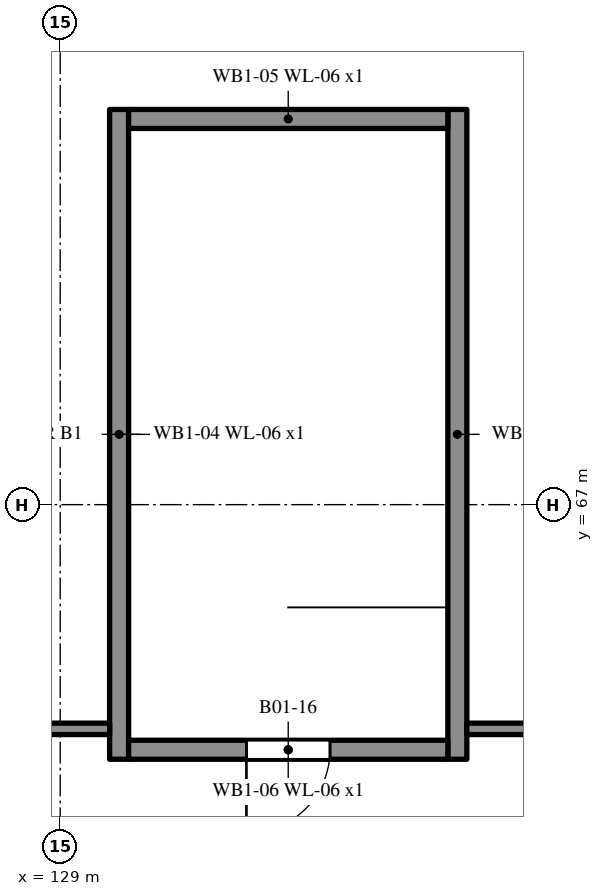
"""IFC4 building model, lengths in metres.
Left out: names, types, materials, properties, quantities, classifications, styles, units other than length and angle.
Written with IfcOpenShell. Run it as: python <this file> out.ifc"""

import sys

from ifc_helpers import new_model, si_unit, direction, frame, frame_2d, origin, place, context, subcontext, project, spatial, rectangle, extrude, element, fill, save


model = new_model("IFC4")
c1 = context("Model", 3, precision=1e-05, world=origin(), true_north=direction((0.0, 1.0)))
c2 = subcontext(c1, "Body", "Model", "MODEL_VIEW")
j1 = project(units=[si_unit("LENGTHUNIT", "METRE"), si_unit("PLANEANGLEUNIT", "RADIAN")], contexts=[c1])
p1 = place(None, origin())
s1 = spatial("IfcSite", under=j1, at=p1, CompositionType="ELEMENT")
p2 = place(p1, origin())
s2 = spatial("IfcBuilding", under=s1, at=p2, CompositionType="ELEMENT")
p3 = place(p2, frame((0.0, 0.0, 5.4)))
s3 = spatial("IfcBuildingStorey", under=s2, at=p3, CompositionType="ELEMENT", Elevation=5.4)
for number, where, z_axis, x_axis in (
    (1, (134.225, 63.65, 0.0), (0.0, 0.0, 1.0), (0.0, 1.0, 0.0)),
    (2, (129.775, 72.2, 0.0), (0.0, 0.0, 1.0), (0.0, -1.0, 0.0)),
):
    element("IfcWall", number, at=place(p3, frame(where, z_axis=z_axis, x_axis=x_axis)), inside=s3, PredefinedType="SHEAR", context=c2, shape_type="SweptSolid", body=[
        extrude(rectangle(XDim=8.55, YDim=0.25, at=frame_2d((4.275, 0.0))), origin(), (0.0, 0.0, 1.0), 4.5),
    ])
p4 = place(p3, frame((129.9, 72.075, 0.0), z_axis=(0.0, 0.0, 1.0), x_axis=(1.0, 0.0, 0.0)))
e3 = element("IfcWall", 3, at=p4, inside=s3, PredefinedType="SHEAR", context=c2, shape_type="SweptSolid", body=[
    extrude(rectangle(XDim=4.2, YDim=0.25, at=frame_2d((2.1, 0.0))), origin(), (0.0, 0.0, 1.0), 4.5),
])
p5 = place(p3, frame((134.1, 63.775, 0.0), z_axis=(0.0, 0.0, 1.0), x_axis=(-1.0, 0.0, 0.0)))
e4 = element("IfcWall", 4, at=p5, inside=s3, PredefinedType="SHEAR", context=c2, shape_type="SweptSolid", body=[
    extrude(rectangle(XDim=4.2, YDim=0.25, at=frame_2d((2.1, 0.0))), origin(), (0.0, 0.0, 1.0), 4.5),
])
p6 = place(p5, frame((1.55, 0.0, 0.0)))
e5 = element("IfcOpeningElement", 5, at=p6, cuts=e4, PredefinedType="OPENING", context=c2, shape_type="SweptSolid", body=[
    extrude(rectangle(XDim=1.1, YDim=2.1, at=frame_2d((0.55, 1.05))), frame((0.0, 0.135, 0.0), z_axis=(0.0, -1.0, 0.0), x_axis=(1.0, 0.0, 0.0)), (0.0, 0.0, 1.0), 0.27),
])
p7 = place(p3, frame((121.809, 64.05, 0.0), z_axis=(0.0, 0.0, 1.0), x_axis=(1.0, 0.0, 0.0)))
e6 = element("IfcWall", 6, at=p7, inside=s3, PredefinedType="PARTITIONING", context=c2, shape_type="SweptSolid", body=[
    extrude(rectangle(XDim=7.842, YDim=0.15, at=frame_2d((3.921, 0.0))), origin(), (0.0, 0.0, 1.0), 4.5),
])
p8 = place(p7, frame((3.471, 0.0, 0.0)))
e7 = element("IfcOpeningElement", 7, at=p8, cuts=e6, PredefinedType="OPENING", context=c2, shape_type="SweptSolid", body=[
    extrude(rectangle(XDim=0.9, YDim=2.1, at=frame_2d((0.45, 1.05))), frame((0.0, 0.085, 0.0), z_axis=(0.0, -1.0, 0.0), x_axis=(1.0, 0.0, 0.0)), (0.0, 0.0, 1.0), 0.17),
])
p9 = place(p3, frame((134.35, 64.05, 0.0), z_axis=(0.0, 0.0, 1.0), x_axis=(1.0, 0.0, 0.0)))
e8 = element("IfcWall", 8, at=p9, inside=s3, PredefinedType="PARTITIONING", context=c2, shape_type="SweptSolid", body=[
    extrude(rectangle(XDim=7.842, YDim=0.15, at=frame_2d((3.921, 0.0))), origin(), (0.0, 0.0, 1.0), 4.5),
])
p10 = place(p9, frame((3.471, 0.0, 0.0)))
e9 = element("IfcOpeningElement", 9, at=p10, cuts=e8, PredefinedType="OPENING", context=c2, shape_type="SweptSolid", body=[
    extrude(rectangle(XDim=0.9, YDim=2.1, at=frame_2d((0.45, 1.05))), frame((0.0, 0.085, 0.0), z_axis=(0.0, -1.0, 0.0), x_axis=(1.0, 0.0, 0.0)), (0.0, 0.0, 1.0), 0.17),
])
p11 = place(p6, origin())
e10 = element("IfcDoor", 10, at=p11, inside=s3, OperationType="SINGLE_SWING_RIGHT", PredefinedType="DOOR", context=c2, shape_type="SweptSolid", body=[
    extrude(rectangle(XDim=1.1, YDim=2.1, at=frame_2d((0.55, 1.05))), frame((0.0, 0.025, 0.0), z_axis=(0.0, -1.0, 0.0), x_axis=(1.0, 0.0, 0.0)), (0.0, 0.0, 1.0), 0.05),
])
fill(e5, e10)
save(model, sys.argv[1])
